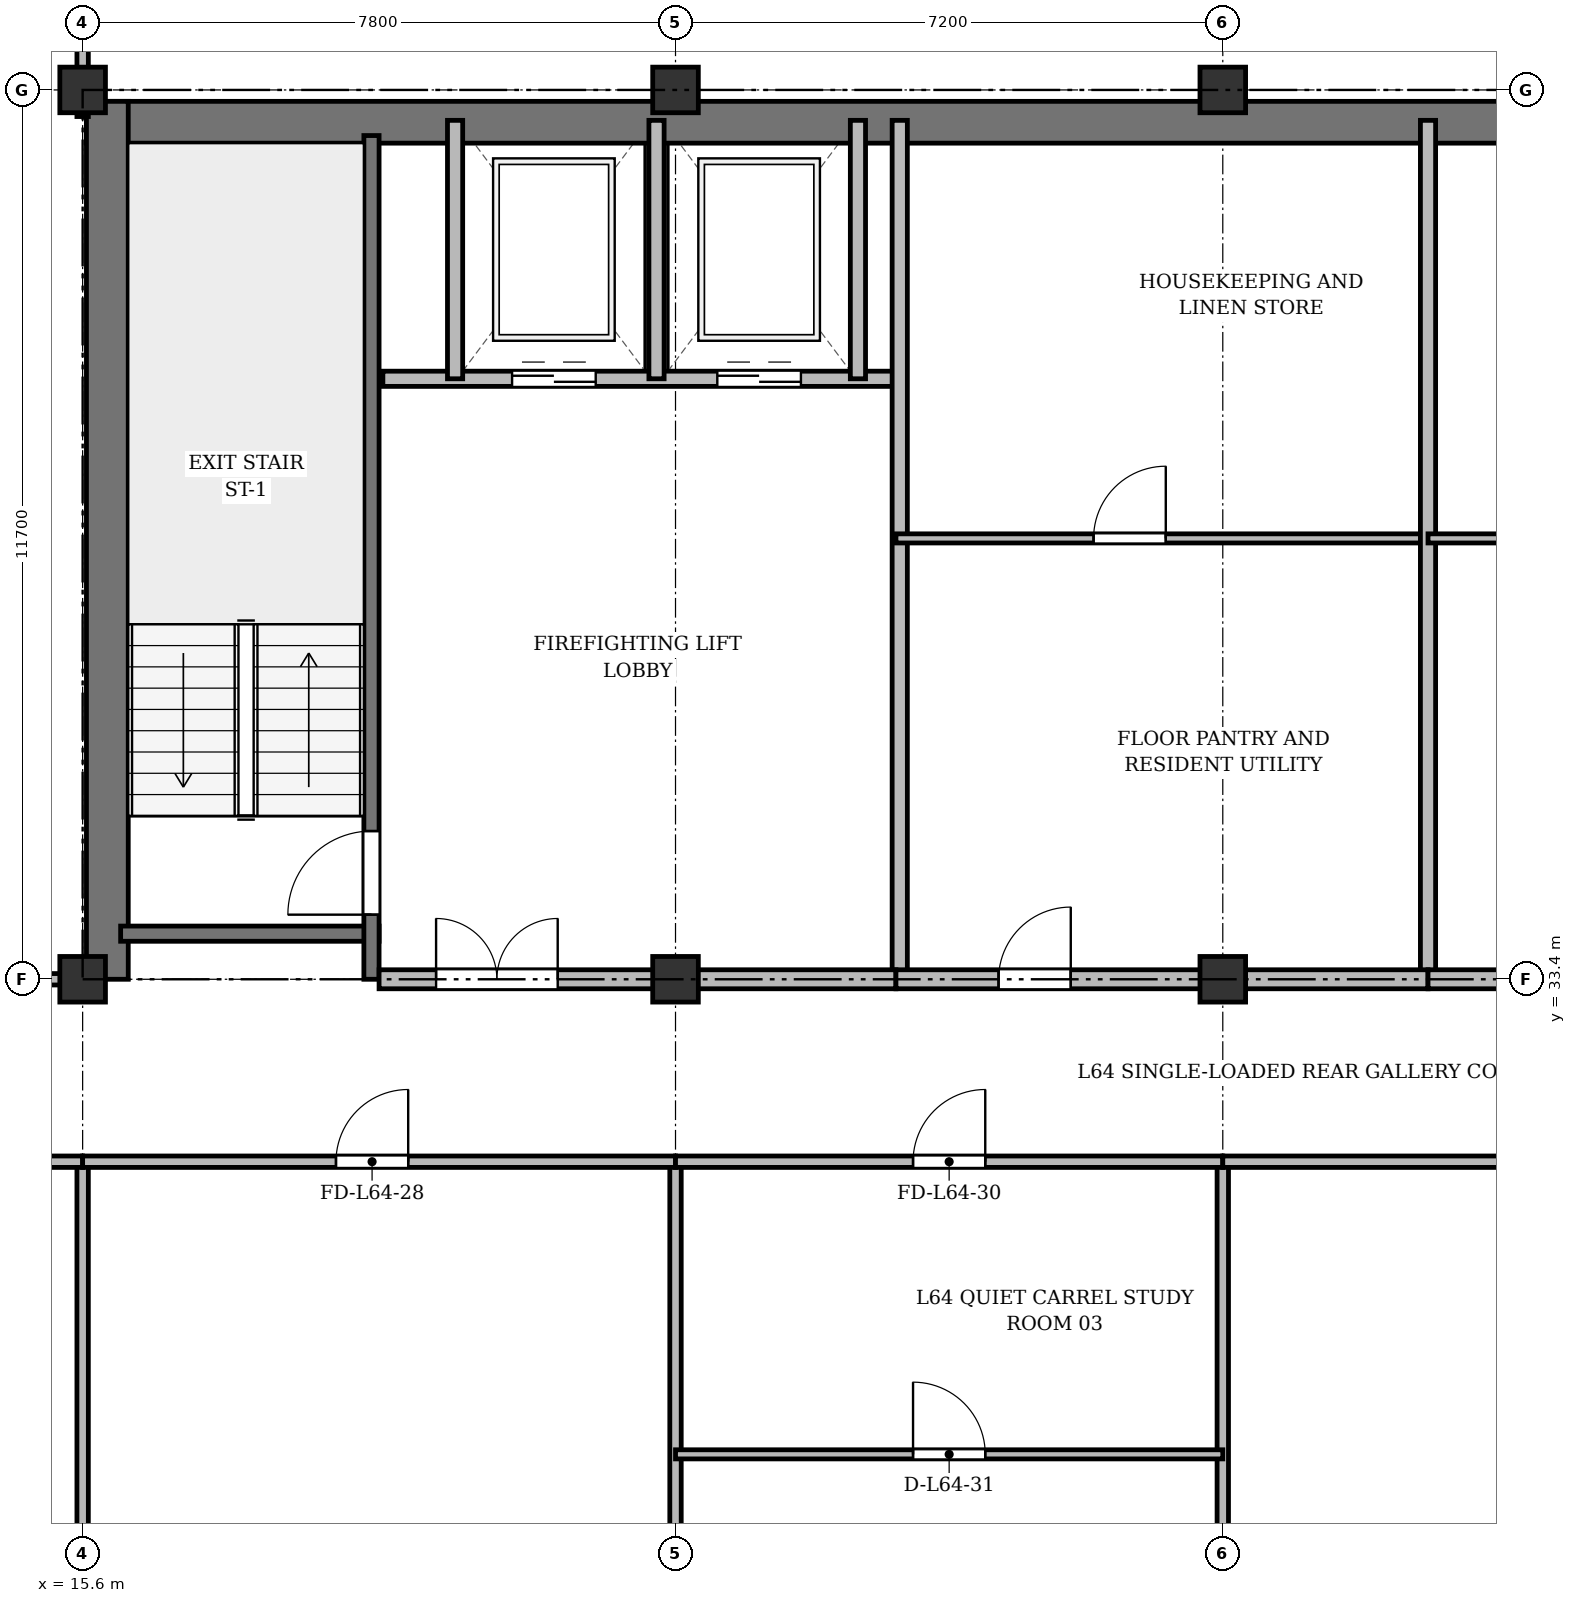
"""IFC4 building model, lengths in metres.
Left out: names, types, materials, properties, quantities, classifications, styles, units other than length and angle.
Written with IfcOpenShell. Run it as: python <this file> out.ifc"""

import sys

from ifc_helpers import new_model, si_unit, direction, frame, frame_2d, origin, origin_2d, place, context, subcontext, project, spatial, rectangle, extrude, source, transform, mapped, element, fill, save


model = new_model("IFC4")
c1 = context("Model", 3, precision=1e-05, world=origin(), true_north=direction((0.0, 1.0)))
c2 = subcontext(c1, "Body", "Model", "MODEL_VIEW")
j1 = project(units=[si_unit("LENGTHUNIT", "METRE"), si_unit("PLANEANGLEUNIT", "RADIAN")], contexts=[c1])
p1 = place(None, origin())
s1 = spatial("IfcSite", under=j1, at=p1, CompositionType="ELEMENT")
p2 = place(p1, origin())
s2 = spatial("IfcBuilding", under=s1, at=p2, CompositionType="ELEMENT")
p3 = place(p2, frame((0.0, 0.0, 248.7)))
s3 = spatial("IfcBuildingStorey", under=s2, at=p3, CompositionType="ELEMENT", Elevation=248.7)
m1 = source(origin(), c2, "Body", "SweptSolid", [
    extrude(rectangle(XDim=0.6, YDim=0.6, at=origin_2d()), origin(), (0.0, 0.0, 1.0), 3.6),
])
for number, where, z_axis, x_axis in (
    (1, (15.6, 33.4, 0.0), (0.0, 0.0, 1.0), (1.0, 0.0, 0.0)),
    (2, (15.6, 45.1, 0.0), (0.0, 0.0, 1.0), (1.0, 0.0, 0.0)),
    (3, (23.4, 33.4, 0.0), (0.0, 0.0, 1.0), (1.0, 0.0, 0.0)),
    (4, (23.4, 45.1, 0.0), (0.0, 0.0, 1.0), (1.0, 0.0, 0.0)),
    (5, (30.6, 33.4, 0.0), (0.0, 0.0, 1.0), (1.0, 0.0, 0.0)),
    (6, (30.6, 45.1, 0.0), (0.0, 0.0, 1.0), (1.0, 0.0, 0.0)),
):
    element("IfcColumn", number, at=place(p3, frame(where, z_axis=z_axis, x_axis=x_axis)), inside=s3, PredefinedType="COLUMN", context=c2, shape_type="MappedRepresentation", body=[
        mapped(m1, transform((0.0, 0.0, 0.0), x_axis=(1.0, 0.0, 0.0), y_axis=(0.0, 1.0, 0.0), z_axis=(0.0, 0.0, 1.0), scale=1.0)),
    ])
p4 = place(p3, frame((15.65, 44.675, 0.0), z_axis=(0.0, 0.0, 1.0), x_axis=(1.0, 0.0, 0.0)))
e7 = element("IfcWall", 7, at=p4, inside=s3, PredefinedType="SHEAR", context=c2, shape_type="SweptSolid", body=[
    extrude(rectangle(XDim=43.1, YDim=0.55, at=frame_2d((21.55, 0.0))), origin(), (0.0, 0.0, 1.0), 3.37),
])
p5 = place(p3, frame((15.925, 33.4, 0.0), z_axis=(0.0, 0.0, 1.0), x_axis=(0.0, 1.0, 0.0)))
e8 = element("IfcWall", 8, at=p5, inside=s3, PredefinedType="SHEAR", context=c2, shape_type="SweptSolid", body=[
    extrude(rectangle(XDim=11.55, YDim=0.55, at=frame_2d((5.775, 0.0))), origin(), (0.0, 0.0, 1.0), 3.37),
])
p6 = place(p3, frame((16.1, 34.0, 0.0), z_axis=(0.0, 0.0, 1.0), x_axis=(1.0, 0.0, 0.0)))
e9 = element("IfcWall", 9, at=p6, inside=s3, PredefinedType="SHEAR", context=c2, shape_type="SweptSolid", body=[
    extrude(rectangle(XDim=3.4, YDim=0.2, at=frame_2d((1.7, 0.0))), origin(), (0.0, 0.0, 1.0), 3.37),
])
p7 = place(p3, frame((19.4, 33.4, 0.0), z_axis=(0.0, 0.0, 1.0), x_axis=(0.0, 1.0, 0.0)))
e10 = element("IfcWall", 10, at=p7, inside=s3, PredefinedType="SHEAR", context=c2, shape_type="SweptSolid", body=[
    extrude(rectangle(XDim=11.1, YDim=0.2, at=frame_2d((5.55, 0.0))), origin(), (0.0, 0.0, 1.0), 3.37),
])
p8 = place(p7, frame((0.85, 0.0, 0.0)))
e11 = element("IfcOpeningElement", 11, at=p8, cuts=e10, PredefinedType="OPENING", context=c2, shape_type="SweptSolid", body=[
    extrude(rectangle(XDim=1.1, YDim=2.15, at=frame_2d((0.55, 1.075))), frame((0.0, 0.11, 0.0), z_axis=(0.0, -1.0, 0.0), x_axis=(1.0, 0.0, 0.0)), (0.0, 0.0, 1.0), 0.22),
])
p9 = place(p3, frame((19.55, 41.3, 0.0), z_axis=(0.0, 0.0, 1.0), x_axis=(1.0, 0.0, 0.0)))
e12 = element("IfcWall", 12, at=p9, inside=s3, PredefinedType="SOLIDWALL", context=c2, shape_type="SweptSolid", body=[
    extrude(rectangle(XDim=6.75, YDim=0.2, at=frame_2d((3.375, 0.0))), origin(), (0.0, 0.0, 1.0), 3.37),
])
p10 = place(p9, frame((1.7, 0.0, 0.0)))
e13 = element("IfcOpeningElement", 13, at=p10, cuts=e12, PredefinedType="OPENING", context=c2, shape_type="SweptSolid", body=[
    extrude(rectangle(XDim=1.1, YDim=2.15, at=frame_2d((0.55, 1.075))), frame((0.0, 0.11, 0.0), z_axis=(0.0, -1.0, 0.0), x_axis=(1.0, 0.0, 0.0)), (0.0, 0.0, 1.0), 0.22),
])
p11 = place(p9, frame((4.4, 0.0, 0.0)))
e14 = element("IfcOpeningElement", 14, at=p11, cuts=e12, PredefinedType="OPENING", context=c2, shape_type="SweptSolid", body=[
    extrude(rectangle(XDim=1.1, YDim=2.15, at=frame_2d((0.55, 1.075))), frame((0.0, 0.11, 0.0), z_axis=(0.0, -1.0, 0.0), x_axis=(1.0, 0.0, 0.0)), (0.0, 0.0, 1.0), 0.22),
])
for number, where, z_axis, x_axis in (
    (15, (20.5, 41.3, 0.0), (0.0, 0.0, 1.0), (0.0, 1.0, 0.0)),
    (16, (23.15, 41.3, 0.0), (0.0, 0.0, 1.0), (0.0, 1.0, 0.0)),
    (17, (25.8, 41.3, 0.0), (0.0, 0.0, 1.0), (0.0, 1.0, 0.0)),
):
    element("IfcWall", number, at=place(p3, frame(where, z_axis=z_axis, x_axis=x_axis)), inside=s3, PredefinedType="SOLIDWALL", context=c2, shape_type="SweptSolid", body=[
        extrude(rectangle(XDim=3.4, YDim=0.2, at=frame_2d((1.7, 0.0))), origin(), (0.0, 0.0, 1.0), 3.37),
    ])
p12 = place(p3, frame((26.35, 33.4, 0.0), z_axis=(0.0, 0.0, 1.0), x_axis=(0.0, 1.0, 0.0)))
e18 = element("IfcWall", 18, at=p12, inside=s3, PredefinedType="SOLIDWALL", context=c2, shape_type="SweptSolid", body=[
    extrude(rectangle(XDim=11.3, YDim=0.2, at=frame_2d((5.65, 0.0))), origin(), (0.0, 0.0, 1.0), 2.92),
])
p13 = place(p3, frame((19.5, 33.4, 0.0), z_axis=(0.0, 0.0, 1.0), x_axis=(1.0, 0.0, 0.0)))
e19 = element("IfcWall", 19, at=p13, inside=s3, PredefinedType="PARTITIONING", context=c2, shape_type="SweptSolid", body=[
    extrude(rectangle(XDim=6.8, YDim=0.25, at=frame_2d((3.4, 0.0))), origin(), (0.0, 0.0, 1.0), 2.92),
])
p14 = place(p13, frame((0.75, 0.0, 0.0)))
e20 = element("IfcOpeningElement", 20, at=p14, cuts=e19, PredefinedType="OPENING", context=c2, shape_type="SweptSolid", body=[
    extrude(rectangle(XDim=1.6, YDim=2.2, at=frame_2d((0.8, 1.1))), frame((0.0, 0.135, 0.0), z_axis=(0.0, -1.0, 0.0), x_axis=(1.0, 0.0, 0.0)), (0.0, 0.0, 1.0), 0.27),
])
p15 = place(p3, frame((26.3, 39.2, 0.0), z_axis=(0.0, 0.0, 1.0), x_axis=(1.0, 0.0, 0.0)))
e21 = element("IfcWall", 21, at=p15, inside=s3, PredefinedType="PARTITIONING", context=c2, shape_type="SweptSolid", body=[
    extrude(rectangle(XDim=7.0, YDim=0.12, at=frame_2d((3.5, 0.0))), origin(), (0.0, 0.0, 1.0), 2.87),
])
p16 = place(p15, frame((2.6, 0.0, 0.0)))
e22 = element("IfcOpeningElement", 22, at=p16, cuts=e21, PredefinedType="OPENING", context=c2, shape_type="SweptSolid", body=[
    extrude(rectangle(XDim=0.95, YDim=2.15, at=frame_2d((0.475, 1.075))), frame((0.0, 0.07, 0.0), z_axis=(0.0, -1.0, 0.0), x_axis=(1.0, 0.0, 0.0)), (0.0, 0.0, 1.0), 0.14),
])
p17 = place(p3, frame((33.3, 33.4, 0.0), z_axis=(0.0, 0.0, 1.0), x_axis=(0.0, 1.0, 0.0)))
e23 = element("IfcWall", 23, at=p17, inside=s3, PredefinedType="SOLIDWALL", context=c2, shape_type="SweptSolid", body=[
    extrude(rectangle(XDim=11.3, YDim=0.2, at=frame_2d((5.65, 0.0))), origin(), (0.0, 0.0, 1.0), 2.92),
])
p18 = place(p3, frame((33.3, 39.2, 0.0), z_axis=(0.0, 0.0, 1.0), x_axis=(1.0, 0.0, 0.0)))
e24 = element("IfcWall", 24, at=p18, inside=s3, PredefinedType="PARTITIONING", context=c2, shape_type="SweptSolid", body=[
    extrude(rectangle(XDim=6.8, YDim=0.12, at=frame_2d((3.4, 0.0))), origin(), (0.0, 0.0, 1.0), 3.37),
])
p19 = place(p18, frame((2.6, 0.0, 0.0)))
e25 = element("IfcOpeningElement", 25, at=p19, cuts=e24, PredefinedType="OPENING", context=c2, shape_type="SweptSolid", body=[
    extrude(rectangle(XDim=0.95, YDim=2.15, at=frame_2d((0.475, 1.075))), frame((0.0, 0.07, 0.0), z_axis=(0.0, -1.0, 0.0), x_axis=(1.0, 0.0, 0.0)), (0.0, 0.0, 1.0), 0.14),
])
p20 = place(p3, frame((26.3, 33.4, 0.0), z_axis=(0.0, 0.0, 1.0), x_axis=(1.0, 0.0, 0.0)))
e26 = element("IfcWall", 26, at=p20, inside=s3, PredefinedType="PARTITIONING", context=c2, shape_type="SweptSolid", body=[
    extrude(rectangle(XDim=7.0, YDim=0.25, at=frame_2d((3.5, 0.0))), origin(), (0.0, 0.0, 1.0), 2.92),
])
p21 = place(p20, frame((1.35, 0.0, 0.0)))
e27 = element("IfcOpeningElement", 27, at=p21, cuts=e26, PredefinedType="OPENING", context=c2, shape_type="SweptSolid", body=[
    extrude(rectangle(XDim=0.95, YDim=2.15, at=frame_2d((0.475, 1.075))), frame((0.0, 0.135, 0.0), z_axis=(0.0, -1.0, 0.0), x_axis=(1.0, 0.0, 0.0)), (0.0, 0.0, 1.0), 0.27),
])
p22 = place(p3, frame((33.3, 33.4, 0.0), z_axis=(0.0, 0.0, 1.0), x_axis=(1.0, 0.0, 0.0)))
e28 = element("IfcWall", 28, at=p22, inside=s3, PredefinedType="PARTITIONING", context=c2, shape_type="SweptSolid", body=[
    extrude(rectangle(XDim=6.8, YDim=0.25, at=frame_2d((3.4, 0.0))), origin(), (0.0, 0.0, 1.0), 2.92),
])
p23 = place(p22, frame((2.4, 0.0, 0.0)))
e29 = element("IfcOpeningElement", 29, at=p23, cuts=e28, PredefinedType="OPENING", context=c2, shape_type="SweptSolid", body=[
    extrude(rectangle(XDim=1.0, YDim=2.15, at=frame_2d((0.5, 1.075))), frame((0.0, 0.135, 0.0), z_axis=(0.0, -1.0, 0.0), x_axis=(1.0, 0.0, 0.0)), (0.0, 0.0, 1.0), 0.27),
])
p24 = place(p3, frame((8.45, 33.4, 0.0), z_axis=(0.0, 0.0, 1.0), x_axis=(1.0, 0.0, 0.0)))
e30 = element("IfcWall", 30, at=p24, inside=s3, PredefinedType="PARTITIONING", context=c2, shape_type="SweptSolid", body=[
    extrude(rectangle(XDim=7.15, YDim=0.15, at=frame_2d((3.575, 0.0))), origin(), (0.0, 0.0, 1.0), 2.92),
])
p25 = place(p24, frame((3.0, 0.0, 0.0)))
e31 = element("IfcOpeningElement", 31, at=p25, cuts=e30, PredefinedType="OPENING", context=c2, shape_type="SweptSolid", body=[
    extrude(rectangle(XDim=0.95, YDim=2.15, at=frame_2d((0.475, 1.075))), frame((0.0, 0.085, 0.0), z_axis=(0.0, -1.0, 0.0), x_axis=(1.0, 0.0, 0.0)), (0.0, 0.0, 1.0), 0.17),
])
p26 = place(p3, frame((15.6, 44.75, 0.0), z_axis=(0.0, 0.0, 1.0), x_axis=(0.0, 1.0, 0.0)))
e32 = element("IfcWall", 32, at=p26, inside=s3, PredefinedType="PARTITIONING", context=c2, shape_type="SweptSolid", body=[
    extrude(rectangle(XDim=3.61, YDim=0.15, at=frame_2d((1.805, 0.0))), origin(), (0.0, 0.0, 1.0), 2.87),
])
p27 = place(p26, frame((1.1, 0.0, 0.0)))
e33 = element("IfcOpeningElement", 33, at=p27, cuts=e32, PredefinedType="OPENING", context=c2, shape_type="SweptSolid", body=[
    extrude(rectangle(XDim=0.95, YDim=2.15, at=frame_2d((0.475, 1.075))), frame((0.0, 0.085, 0.0), z_axis=(0.0, -1.0, 0.0), x_axis=(1.0, 0.0, 0.0)), (0.0, 0.0, 1.0), 0.17),
])
for number, where, z_axis, x_axis in (
    (34, (15.6, 3.725, 0.0), (0.0, 0.0, 1.0), (0.0, 1.0, 0.0)),
    (35, (23.4, 3.725, 0.0), (0.0, 0.0, 1.0), (0.0, 1.0, 0.0)),
    (36, (30.6, 3.725, 0.0), (0.0, 0.0, 1.0), (0.0, 1.0, 0.0)),
):
    element("IfcWall", number, at=place(p3, frame(where, z_axis=z_axis, x_axis=x_axis)), inside=s3, PredefinedType="PARTITIONING", context=c2, shape_type="SweptSolid", body=[
        extrude(rectangle(XDim=27.275, YDim=0.15, at=frame_2d((13.637, 0.0))), origin(), (0.0, 0.0, 1.0), 2.87),
    ])
p28 = place(p3, frame((8.425, 31.0, 0.0), z_axis=(0.0, 0.0, 1.0), x_axis=(1.0, 0.0, 0.0)))
e37 = element("IfcWall", 37, at=p28, inside=s3, PredefinedType="PARTITIONING", context=c2, shape_type="SweptSolid", body=[
    extrude(rectangle(XDim=7.175, YDim=0.15, at=frame_2d((3.587, 0.0))), origin(), (0.0, 0.0, 1.0), 2.87),
])
p29 = place(p28, frame((3.112, 0.0, 0.0)))
e38 = element("IfcOpeningElement", 38, at=p29, cuts=e37, PredefinedType="OPENING", context=c2, shape_type="SweptSolid", body=[
    extrude(rectangle(XDim=0.95, YDim=2.15, at=frame_2d((0.475, 1.075))), frame((0.0, 0.085, 0.0), z_axis=(0.0, -1.0, 0.0), x_axis=(1.0, 0.0, 0.0)), (0.0, 0.0, 1.0), 0.17),
])
p30 = place(p3, frame((15.6, 31.0, 0.0), z_axis=(0.0, 0.0, 1.0), x_axis=(1.0, 0.0, 0.0)))
e39 = element("IfcWall", 39, at=p30, inside=s3, PredefinedType="PARTITIONING", context=c2, shape_type="SweptSolid", body=[
    extrude(rectangle(XDim=7.8, YDim=0.15, at=frame_2d((3.9, 0.0))), origin(), (0.0, 0.0, 1.0), 2.87),
])
p31 = place(p30, frame((3.333, 0.0, 0.0)))
e40 = element("IfcOpeningElement", 40, at=p31, cuts=e39, PredefinedType="OPENING", context=c2, shape_type="SweptSolid", body=[
    extrude(rectangle(XDim=0.95, YDim=2.15, at=frame_2d((0.475, 1.075))), frame((0.0, 0.085, 0.0), z_axis=(0.0, -1.0, 0.0), x_axis=(1.0, 0.0, 0.0)), (0.0, 0.0, 1.0), 0.17),
])
p32 = place(p3, frame((23.4, 31.0, 0.0), z_axis=(0.0, 0.0, 1.0), x_axis=(1.0, 0.0, 0.0)))
e41 = element("IfcWall", 41, at=p32, inside=s3, PredefinedType="PARTITIONING", context=c2, shape_type="SweptSolid", body=[
    extrude(rectangle(XDim=7.2, YDim=0.15, at=frame_2d((3.6, 0.0))), origin(), (0.0, 0.0, 1.0), 2.87),
])
p33 = place(p32, frame((3.125, 0.0, 0.0)))
e42 = element("IfcOpeningElement", 42, at=p33, cuts=e41, PredefinedType="OPENING", context=c2, shape_type="SweptSolid", body=[
    extrude(rectangle(XDim=0.95, YDim=2.15, at=frame_2d((0.475, 1.075))), frame((0.0, 0.085, 0.0), z_axis=(0.0, -1.0, 0.0), x_axis=(1.0, 0.0, 0.0)), (0.0, 0.0, 1.0), 0.17),
])
p34 = place(p3, frame((23.4, 27.15, 0.0), z_axis=(0.0, 0.0, 1.0), x_axis=(1.0, 0.0, 0.0)))
e43 = element("IfcWall", 43, at=p34, inside=s3, PredefinedType="PARTITIONING", context=c2, shape_type="SweptSolid", body=[
    extrude(rectangle(XDim=7.2, YDim=0.12, at=frame_2d((3.6, 0.0))), origin(), (0.0, 0.0, 1.0), 2.87),
])
p35 = place(p34, frame((3.125, 0.0, 0.0)))
e44 = element("IfcOpeningElement", 44, at=p35, cuts=e43, PredefinedType="OPENING", context=c2, shape_type="SweptSolid", body=[
    extrude(rectangle(XDim=0.95, YDim=2.15, at=frame_2d((0.475, 1.075))), frame((0.0, 0.07, 0.0), z_axis=(0.0, -1.0, 0.0), x_axis=(1.0, 0.0, 0.0)), (0.0, 0.0, 1.0), 0.14),
])
p36 = place(p3, frame((30.6, 31.0, 0.0), z_axis=(0.0, 0.0, 1.0), x_axis=(1.0, 0.0, 0.0)))
e45 = element("IfcWall", 45, at=p36, inside=s3, PredefinedType="PARTITIONING", context=c2, shape_type="SweptSolid", body=[
    extrude(rectangle(XDim=13.2, YDim=0.15, at=frame_2d((6.6, 0.0))), origin(), (0.0, 0.0, 1.0), 2.87),
])
p37 = place(p36, frame((5.8, 0.0, 0.0)))
e46 = element("IfcOpeningElement", 46, at=p37, cuts=e45, PredefinedType="OPENING", context=c2, shape_type="SweptSolid", body=[
    extrude(rectangle(XDim=1.6, YDim=2.2, at=frame_2d((0.8, 1.1))), frame((0.0, 0.085, 0.0), z_axis=(0.0, -1.0, 0.0), x_axis=(1.0, 0.0, 0.0)), (0.0, 0.0, 1.0), 0.17),
])
m2 = source(origin(), c2, "Body", "SweptSolid", [
    extrude(rectangle(XDim=1.1, YDim=2.15, at=frame_2d((0.55, 1.075))), frame((0.0, 0.025, 0.0), z_axis=(0.0, -1.0, 0.0), x_axis=(1.0, 0.0, 0.0)), (0.0, 0.0, 1.0), 0.05),
])
p38 = place(p8, origin())
e47 = element("IfcDoor", 47, at=p38, inside=s3, OperationType="SINGLE_SWING_LEFT", PredefinedType="DOOR", context=c2, shape_type="MappedRepresentation", body=[
    mapped(m2, transform((0.0, 0.0, 0.0), x_axis=(1.0, 0.0, 0.0), y_axis=(0.0, 1.0, 0.0), z_axis=(0.0, 0.0, 1.0), scale=1.0)),
])
fill(e11, e47)
p39 = place(p10, origin())
e48 = element("IfcDoor", 48, at=p39, inside=s3, OperationType="DOUBLE_DOOR_SLIDING", PredefinedType="DOOR", context=c2, shape_type="MappedRepresentation", body=[
    mapped(m2, transform((0.0, 0.0, 0.0), x_axis=(1.0, 0.0, 0.0), y_axis=(0.0, 1.0, 0.0), z_axis=(0.0, 0.0, 1.0), scale=1.0)),
])
fill(e13, e48)
p40 = place(p11, origin())
e49 = element("IfcDoor", 49, at=p40, inside=s3, OperationType="DOUBLE_DOOR_SLIDING", PredefinedType="DOOR", context=c2, shape_type="MappedRepresentation", body=[
    mapped(m2, transform((0.0, 0.0, 0.0), x_axis=(1.0, 0.0, 0.0), y_axis=(0.0, 1.0, 0.0), z_axis=(0.0, 0.0, 1.0), scale=1.0)),
])
fill(e14, e49)
m3 = source(origin(), c2, "Body", "SweptSolid", [
    extrude(rectangle(XDim=1.6, YDim=2.2, at=frame_2d((0.8, 1.1))), frame((0.0, 0.025, 0.0), z_axis=(0.0, -1.0, 0.0), x_axis=(1.0, 0.0, 0.0)), (0.0, 0.0, 1.0), 0.05),
])
p41 = place(p14, origin())
e50 = element("IfcDoor", 50, at=p41, inside=s3, OperationType="DOUBLE_DOOR_SINGLE_SWING", PredefinedType="DOOR", context=c2, shape_type="MappedRepresentation", body=[
    mapped(m3, transform((0.0, 0.0, 0.0), x_axis=(1.0, 0.0, 0.0), y_axis=(0.0, 1.0, 0.0), z_axis=(0.0, 0.0, 1.0), scale=1.0)),
])
fill(e20, e50)
m4 = source(origin(), c2, "Body", "SweptSolid", [
    extrude(rectangle(XDim=0.95, YDim=2.15, at=frame_2d((0.475, 1.075))), frame((0.0, 0.025, 0.0), z_axis=(0.0, -1.0, 0.0), x_axis=(1.0, 0.0, 0.0)), (0.0, 0.0, 1.0), 0.05),
])
p42 = place(p16, origin())
e51 = element("IfcDoor", 51, at=p42, inside=s3, OperationType="SINGLE_SWING_RIGHT", PredefinedType="DOOR", context=c2, shape_type="MappedRepresentation", body=[
    mapped(m4, transform((0.0, 0.0, 0.0), x_axis=(1.0, 0.0, 0.0), y_axis=(0.0, 1.0, 0.0), z_axis=(0.0, 0.0, 1.0), scale=1.0)),
])
fill(e22, e51)
p43 = place(p21, origin())
e52 = element("IfcDoor", 52, at=p43, inside=s3, OperationType="SINGLE_SWING_RIGHT", PredefinedType="DOOR", context=c2, shape_type="MappedRepresentation", body=[
    mapped(m4, transform((0.0, 0.0, 0.0), x_axis=(1.0, 0.0, 0.0), y_axis=(0.0, 1.0, 0.0), z_axis=(0.0, 0.0, 1.0), scale=1.0)),
])
fill(e27, e52)
p44 = place(p31, origin())
e53 = element("IfcDoor", 53, at=p44, inside=s3, OperationType="SINGLE_SWING_RIGHT", PredefinedType="DOOR", context=c2, shape_type="MappedRepresentation", body=[
    mapped(m4, transform((0.0, 0.0, 0.0), x_axis=(1.0, 0.0, 0.0), y_axis=(0.0, 1.0, 0.0), z_axis=(0.0, 0.0, 1.0), scale=1.0)),
])
fill(e40, e53)
p45 = place(p33, origin())
e54 = element("IfcDoor", 54, at=p45, inside=s3, OperationType="SINGLE_SWING_RIGHT", PredefinedType="DOOR", context=c2, shape_type="MappedRepresentation", body=[
    mapped(m4, transform((0.0, 0.0, 0.0), x_axis=(1.0, 0.0, 0.0), y_axis=(0.0, 1.0, 0.0), z_axis=(0.0, 0.0, 1.0), scale=1.0)),
])
fill(e42, e54)
p46 = place(p35, origin())
e55 = element("IfcDoor", 55, at=p46, inside=s3, OperationType="SINGLE_SWING_LEFT", PredefinedType="DOOR", context=c2, shape_type="MappedRepresentation", body=[
    mapped(m4, transform((0.0, 0.0, 0.0), x_axis=(1.0, 0.0, 0.0), y_axis=(0.0, 1.0, 0.0), z_axis=(0.0, 0.0, 1.0), scale=1.0)),
])
fill(e44, e55)
save(model, sys.argv[1])
